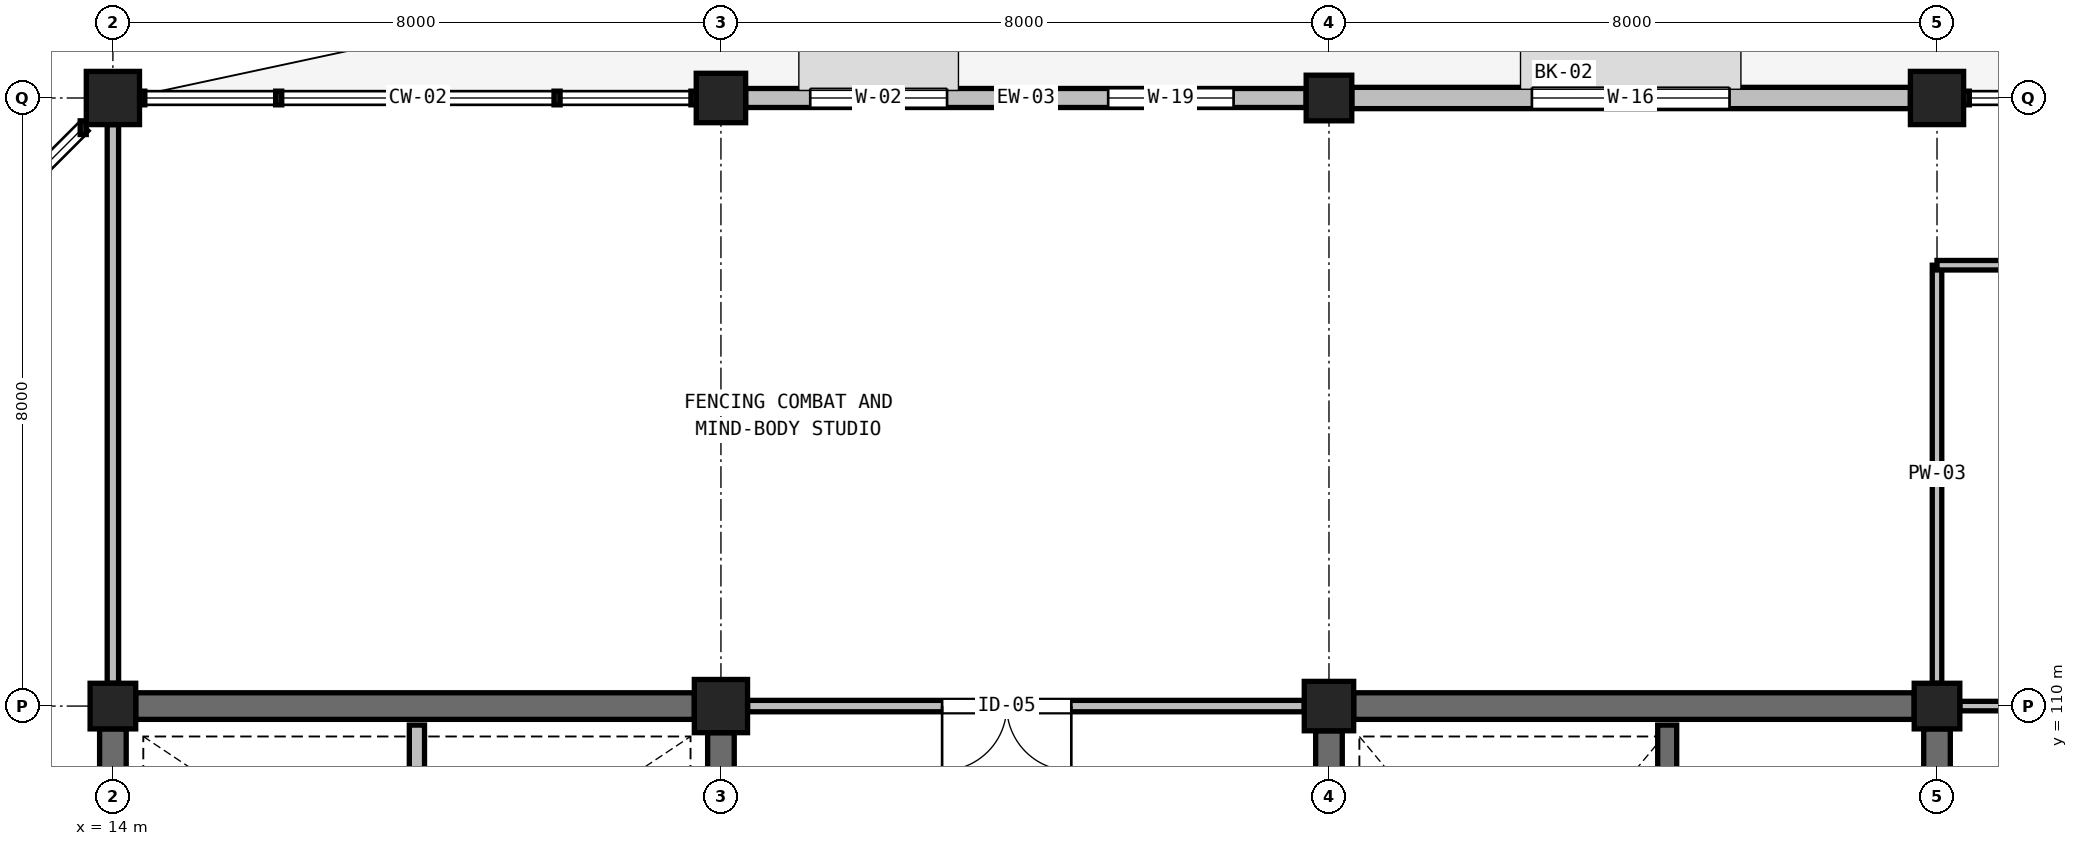
"""IFC4 building model, lengths in metres.
Left out: names, types, materials, properties, quantities, classifications, styles, units other than length and angle.
Written with IfcOpenShell. Run it as: python <this file> out.ifc"""

import sys

from ifc_helpers import new_model, si_unit, direction, frame, frame_2d, origin, origin_2d, place, context, subcontext, project, spatial, rectangle, extrude, element, fill, save


model = new_model("IFC4")
c1 = context("Model", 3, precision=1e-05, world=origin(), true_north=direction((0.0, 1.0)))
c2 = subcontext(c1, "Body", "Model", "MODEL_VIEW")
j1 = project(units=[si_unit("LENGTHUNIT", "METRE"), si_unit("PLANEANGLEUNIT", "RADIAN")], contexts=[c1])
p1 = place(None, origin())
s1 = spatial("IfcSite", under=j1, at=p1, CompositionType="ELEMENT")
p2 = place(p1, origin())
s2 = spatial("IfcBuilding", under=s1, at=p2, CompositionType="ELEMENT")
p3 = place(p2, frame((0.0, 0.0, 10.8)))
s3 = spatial("IfcBuildingStorey", under=s2, at=p3, CompositionType="ELEMENT", Elevation=10.8)
p4 = place(p3, frame((14.0, 110.0, 0.0), z_axis=(0.0, 0.0, 1.0), x_axis=(1.0, 0.0, 0.0)))
e1 = element("IfcColumn", 1, at=p4, inside=s3, PredefinedType="COLUMN", context=c2, shape_type="SweptSolid", body=[
    extrude(rectangle(XDim=0.6, YDim=0.6, at=origin_2d()), origin(), (0.0, 0.0, 1.0), 4.2),
])
for number, where, z_axis, x_axis in (
    (2, (14.0, 118.0, 0.0), (0.0, 0.0, 1.0), (1.0, 0.0, 0.0)),
    (3, (22.0, 110.0, 0.0), (0.0, 0.0, 1.0), (1.0, 0.0, 0.0)),
):
    element("IfcColumn", number, at=place(p3, frame(where, z_axis=z_axis, x_axis=x_axis)), inside=s3, PredefinedType="COLUMN", context=c2, shape_type="SweptSolid", body=[
        extrude(rectangle(XDim=0.7, YDim=0.7, at=origin_2d()), origin(), (0.0, 0.0, 1.0), 4.2),
    ])
for number, where, z_axis, x_axis in (
    (4, (22.0, 118.0, 0.0), (0.0, 0.0, 1.0), (1.0, 0.0, 0.0)),
    (5, (30.0, 110.0, 0.0), (0.0, 0.0, 1.0), (1.0, 0.0, 0.0)),
):
    element("IfcColumn", number, at=place(p3, frame(where, z_axis=z_axis, x_axis=x_axis)), inside=s3, PredefinedType="COLUMN", context=c2, shape_type="SweptSolid", body=[
        extrude(rectangle(XDim=0.65, YDim=0.65, at=origin_2d()), origin(), (0.0, 0.0, 1.0), 4.2),
    ])
for number, where, z_axis, x_axis in (
    (6, (30.0, 118.0, 0.0), (0.0, 0.0, 1.0), (1.0, 0.0, 0.0)),
    (7, (38.0, 110.0, 0.0), (0.0, 0.0, 1.0), (1.0, 0.0, 0.0)),
):
    element("IfcColumn", number, at=place(p3, frame(where, z_axis=z_axis, x_axis=x_axis)), inside=s3, PredefinedType="COLUMN", context=c2, shape_type="SweptSolid", body=[
        extrude(rectangle(XDim=0.6, YDim=0.6, at=origin_2d()), origin(), (0.0, 0.0, 1.0), 4.2),
    ])
p5 = place(p3, frame((38.0, 118.0, 0.0), z_axis=(0.0, 0.0, 1.0), x_axis=(1.0, 0.0, 0.0)))
e8 = element("IfcColumn", 8, at=p5, inside=s3, PredefinedType="COLUMN", context=c2, shape_type="SweptSolid", body=[
    extrude(rectangle(XDim=0.7, YDim=0.7, at=origin_2d()), origin(), (0.0, 0.0, 1.0), 4.2),
])
p6 = place(p3, frame((22.325, 118.0, 0.0), z_axis=(0.0, 0.0, 1.0), x_axis=(1.0, 0.0, 0.0)))
e9 = element("IfcWall", 9, at=p6, inside=s3, PredefinedType="SOLIDWALL", context=c2, shape_type="SweptSolid", body=[
    extrude(rectangle(XDim=7.375, YDim=0.25, at=frame_2d((3.688, 0.0))), origin(), (0.0, 0.0, 1.0), 3.16),
])
p7 = place(p6, frame((0.85, 0.0, 0.75)))
e10 = element("IfcOpeningElement", 10, at=p7, cuts=e9, PredefinedType="OPENING", context=c2, shape_type="SweptSolid", body=[
    extrude(rectangle(XDim=1.8, YDim=1.8, at=frame_2d((0.9, 0.9))), frame((0.0, 0.135, 0.0), z_axis=(0.0, -1.0, 0.0), x_axis=(1.0, 0.0, 0.0)), (0.0, 0.0, 1.0), 0.27),
])
p8 = place(p6, frame((4.77, 0.0, 0.7)))
e11 = element("IfcOpeningElement", 11, at=p8, cuts=e9, PredefinedType="OPENING", context=c2, shape_type="SweptSolid", body=[
    extrude(rectangle(XDim=1.65, YDim=1.85, at=frame_2d((0.825, 0.925))), frame((0.0, 0.135, 0.0), z_axis=(0.0, -1.0, 0.0), x_axis=(1.0, 0.0, 0.0)), (0.0, 0.0, 1.0), 0.27),
])
p9 = place(p3, frame((30.3, 118.0, 0.0), z_axis=(0.0, 0.0, 1.0), x_axis=(1.0, 0.0, 0.0)))
e12 = element("IfcWall", 12, at=p9, inside=s3, PredefinedType="SOLIDWALL", context=c2, shape_type="SweptSolid", body=[
    extrude(rectangle(XDim=7.35, YDim=0.28, at=frame_2d((3.675, 0.0))), origin(), (0.0, 0.0, 1.0), 3.16),
])
p10 = place(p9, frame((2.37, 0.0, 1.45)))
e13 = element("IfcOpeningElement", 13, at=p10, cuts=e12, PredefinedType="OPENING", context=c2, shape_type="SweptSolid", body=[
    extrude(rectangle(XDim=2.6, YDim=1.1, at=frame_2d((1.3, 0.55))), frame((0.0, 0.15, 0.0), z_axis=(0.0, -1.0, 0.0), x_axis=(1.0, 0.0, 0.0)), (0.0, 0.0, 1.0), 0.3),
])
p11 = place(p3, frame((14.3, 110.0, 0.0), z_axis=(0.0, 0.0, 1.0), x_axis=(1.0, 0.0, 0.0)))
e14 = element("IfcWall", 14, at=p11, inside=s3, PredefinedType="SHEAR", context=c2, shape_type="SweptSolid", body=[
    extrude(rectangle(XDim=7.35, YDim=0.35, at=frame_2d((3.675, 0.0))), origin(), (0.0, 0.0, 1.0), 3.98),
])
p12 = place(p3, frame((14.0, 102.325, 0.0), z_axis=(0.0, 0.0, 1.0), x_axis=(0.0, 1.0, 0.0)))
e15 = element("IfcWall", 15, at=p12, inside=s3, PredefinedType="SHEAR", context=c2, shape_type="SweptSolid", body=[
    extrude(rectangle(XDim=7.375, YDim=0.35, at=frame_2d((3.688, 0.0))), origin(), (0.0, 0.0, 1.0), 3.98),
])
p13 = place(p3, frame((22.0, 102.3, 0.0), z_axis=(0.0, 0.0, 1.0), x_axis=(0.0, 1.0, 0.0)))
e16 = element("IfcWall", 16, at=p13, inside=s3, PredefinedType="SHEAR", context=c2, shape_type="SweptSolid", body=[
    extrude(rectangle(XDim=7.35, YDim=0.35, at=frame_2d((3.675, 0.0))), origin(), (0.0, 0.0, 1.0), 3.98),
])
p14 = place(p13, frame((0.35, 0.0, 0.0)))
e17 = element("IfcOpeningElement", 17, at=p14, cuts=e16, PredefinedType="OPENING", context=c2, shape_type="SweptSolid", body=[
    extrude(rectangle(XDim=1.8, YDim=2.2, at=frame_2d((0.9, 1.1))), frame((0.0, 0.185, 0.0), z_axis=(0.0, -1.0, 0.0), x_axis=(1.0, 0.0, 0.0)), (0.0, 0.0, 1.0), 0.37),
])
p15 = place(p3, frame((18.0, 105.35, 0.0), z_axis=(0.0, 0.0, 1.0), x_axis=(0.0, 1.0, 0.0)))
e18 = element("IfcWall", 18, at=p15, inside=s3, PredefinedType="PARTITIONING", context=c2, shape_type="SweptSolid", body=[
    extrude(rectangle(XDim=4.4, YDim=0.2, at=frame_2d((2.2, 0.0))), origin(), (0.0, 0.0, 1.0), 3.9),
])
p16 = place(p3, frame((30.325, 110.0, 0.0), z_axis=(0.0, 0.0, 1.0), x_axis=(1.0, 0.0, 0.0)))
e19 = element("IfcWall", 19, at=p16, inside=s3, PredefinedType="SHEAR", context=c2, shape_type="SweptSolid", body=[
    extrude(rectangle(XDim=7.375, YDim=0.35, at=frame_2d((3.688, 0.0))), origin(), (0.0, 0.0, 1.0), 3.98),
])
p17 = place(p3, frame((30.0, 102.35, 0.0), z_axis=(0.0, 0.0, 1.0), x_axis=(0.0, 1.0, 0.0)))
e20 = element("IfcWall", 20, at=p17, inside=s3, PredefinedType="SHEAR", context=c2, shape_type="SweptSolid", body=[
    extrude(rectangle(XDim=7.325, YDim=0.35, at=frame_2d((3.663, 0.0))), origin(), (0.0, 0.0, 1.0), 3.98),
])
p18 = place(p17, frame((0.35, 0.0, 0.0)))
e21 = element("IfcOpeningElement", 21, at=p18, cuts=e20, PredefinedType="OPENING", context=c2, shape_type="SweptSolid", body=[
    extrude(rectangle(XDim=1.8, YDim=2.2, at=frame_2d((0.9, 1.1))), frame((0.0, 0.185, 0.0), z_axis=(0.0, -1.0, 0.0), x_axis=(1.0, 0.0, 0.0)), (0.0, 0.0, 1.0), 0.37),
])
p19 = place(p3, frame((38.0, 102.325, 0.0), z_axis=(0.0, 0.0, 1.0), x_axis=(0.0, 1.0, 0.0)))
e22 = element("IfcWall", 22, at=p19, inside=s3, PredefinedType="SHEAR", context=c2, shape_type="SweptSolid", body=[
    extrude(rectangle(XDim=7.375, YDim=0.35, at=frame_2d((3.688, 0.0))), origin(), (0.0, 0.0, 1.0), 3.98),
])
p20 = place(p3, frame((34.45, 105.2, 0.0), z_axis=(0.0, 0.0, 1.0), x_axis=(0.0, 1.0, 0.0)))
e23 = element("IfcWall", 23, at=p20, inside=s3, PredefinedType="SOLIDWALL", context=c2, shape_type="SweptSolid", body=[
    extrude(rectangle(XDim=4.55, YDim=0.25, at=frame_2d((2.275, 0.0))), origin(), (0.0, 0.0, 1.0), 3.98),
])
p21 = place(p3, frame((14.0, 110.3, 0.0), z_axis=(0.0, 0.0, 1.0), x_axis=(0.0, 1.0, 0.0)))
e24 = element("IfcWall", 24, at=p21, inside=s3, PredefinedType="PARTITIONING", context=c2, shape_type="SweptSolid", body=[
    extrude(rectangle(XDim=7.35, YDim=0.15, at=frame_2d((3.675, 0.0))), origin(), (0.0, 0.0, 1.0), 3.24),
])
p22 = place(p3, frame((38.0, 110.3, 0.0), z_axis=(0.0, 0.0, 1.0), x_axis=(0.0, 1.0, 0.0)))
e25 = element("IfcWall", 25, at=p22, inside=s3, PredefinedType="PARTITIONING", context=c2, shape_type="SweptSolid", body=[
    extrude(rectangle(XDim=5.5, YDim=0.125, at=frame_2d((2.75, 0.0))), origin(), (0.0, 0.0, 1.0), 3.21),
])
p23 = place(p3, frame((22.35, 110.0, 0.0), z_axis=(0.0, 0.0, 1.0), x_axis=(1.0, 0.0, 0.0)))
e26 = element("IfcWall", 26, at=p23, inside=s3, PredefinedType="PARTITIONING", context=c2, shape_type="SweptSolid", body=[
    extrude(rectangle(XDim=7.325, YDim=0.15, at=frame_2d((3.663, 0.0))), origin(), (0.0, 0.0, 1.0), 3.06),
])
p24 = place(p23, frame((2.56, 0.0, 0.0)))
e27 = element("IfcOpeningElement", 27, at=p24, cuts=e26, PredefinedType="OPENING", context=c2, shape_type="SweptSolid", body=[
    extrude(rectangle(XDim=1.7, YDim=2.25, at=frame_2d((0.85, 1.125))), frame((0.0, 0.085, 0.0), z_axis=(0.0, -1.0, 0.0), x_axis=(1.0, 0.0, 0.0)), (0.0, 0.0, 1.0), 0.17),
])
p25 = place(p3, frame((38.3, 110.0, 0.0), z_axis=(0.0, 0.0, 1.0), x_axis=(1.0, 0.0, 0.0)))
e28 = element("IfcWall", 28, at=p25, inside=s3, PredefinedType="PARTITIONING", context=c2, shape_type="SweptSolid", body=[
    extrude(rectangle(XDim=7.35, YDim=0.125, at=frame_2d((3.675, 0.0))), origin(), (0.0, 0.0, 1.0), 2.96),
])
p26 = place(p25, frame((2.57, 0.0, 0.0)))
e29 = element("IfcOpeningElement", 29, at=p26, cuts=e28, PredefinedType="OPENING", context=c2, shape_type="SweptSolid", body=[
    extrude(rectangle(XDim=0.95, YDim=2.1, at=frame_2d((0.475, 1.05))), frame((0.0, 0.073, 0.0), z_axis=(0.0, -1.0, 0.0), x_axis=(1.0, 0.0, 0.0)), (0.0, 0.0, 1.0), 0.145),
])
p27 = place(p3, frame((38.0, 115.8, 0.0), z_axis=(0.0, 0.0, 1.0), x_axis=(1.0, 0.0, 0.0)))
e30 = element("IfcWall", 30, at=p27, inside=s3, PredefinedType="PARTITIONING", context=c2, shape_type="SweptSolid", body=[
    extrude(rectangle(XDim=8.0, YDim=0.125, at=frame_2d((4.0, 0.0))), origin(), (0.0, 0.0, 1.0), 3.9),
])
p28 = place(p7, origin())
e31 = element("IfcWindow", 31, at=p28, inside=s3, PartitioningType="SINGLE_PANEL", PredefinedType="WINDOW", context=c2, shape_type="SweptSolid", body=[
    extrude(rectangle(XDim=1.8, YDim=1.8, at=frame_2d((0.9, 0.9))), frame((0.0, 0.03, 0.0), z_axis=(0.0, -1.0, 0.0), x_axis=(1.0, 0.0, 0.0)), (0.0, 0.0, 1.0), 0.06),
])
fill(e10, e31)
p29 = place(p8, origin())
e32 = element("IfcWindow", 32, at=p29, inside=s3, PartitioningType="SINGLE_PANEL", PredefinedType="WINDOW", context=c2, shape_type="SweptSolid", body=[
    extrude(rectangle(XDim=1.65, YDim=1.85, at=frame_2d((0.825, 0.925))), frame((0.0, 0.03, 0.0), z_axis=(0.0, -1.0, 0.0), x_axis=(1.0, 0.0, 0.0)), (0.0, 0.0, 1.0), 0.06),
])
fill(e11, e32)
p30 = place(p10, origin())
e33 = element("IfcWindow", 33, at=p30, inside=s3, PartitioningType="SINGLE_PANEL", PredefinedType="WINDOW", context=c2, shape_type="SweptSolid", body=[
    extrude(rectangle(XDim=2.6, YDim=1.1, at=frame_2d((1.3, 0.55))), frame((0.0, 0.03, 0.0), z_axis=(0.0, -1.0, 0.0), x_axis=(1.0, 0.0, 0.0)), (0.0, 0.0, 1.0), 0.06),
])
fill(e13, e33)
p31 = place(p24, frame((1.7, 0.0, 0.0), z_axis=(0.0, 0.0, 1.0), x_axis=(-1.0, 0.0, 0.0)))
e34 = element("IfcDoor", 34, at=p31, inside=s3, OperationType="DOUBLE_DOOR_SINGLE_SWING", PredefinedType="DOOR", context=c2, shape_type="SweptSolid", body=[
    extrude(rectangle(XDim=1.7, YDim=2.25, at=frame_2d((0.85, 1.125))), frame((0.0, 0.025, 0.0), z_axis=(0.0, -1.0, 0.0), x_axis=(1.0, 0.0, 0.0)), (0.0, 0.0, 1.0), 0.05),
])
fill(e27, e34)
save(model, sys.argv[1])
